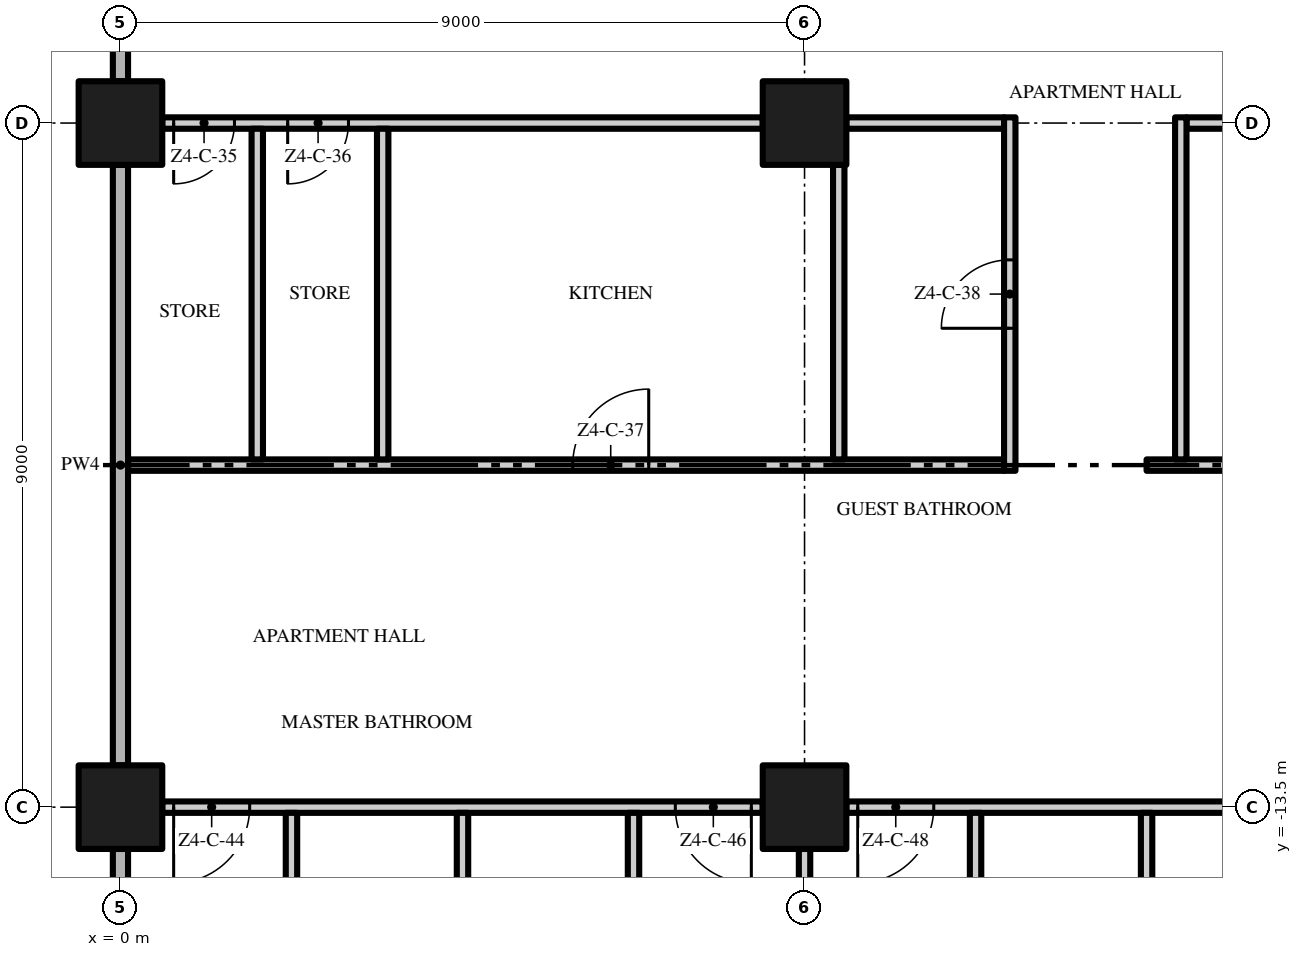
"""IFC4 building model, lengths in metres.
Left out: names, types, materials, properties, quantities, classifications, styles, units other than length and angle.
Written with IfcOpenShell. Run it as: python <this file> out.ifc"""

import sys

from ifc_helpers import new_model, si_unit, direction, frame, frame_2d, origin, origin_2d, place, context, subcontext, project, spatial, rectangle, extrude, element, fill, save


model = new_model("IFC4")
c1 = context("Model", 3, precision=1e-05, world=origin(), true_north=direction((0.0, 1.0)))
c2 = subcontext(c1, "Body", "Model", "MODEL_VIEW")
j1 = project(units=[si_unit("LENGTHUNIT", "METRE"), si_unit("PLANEANGLEUNIT", "RADIAN")], contexts=[c1])
p1 = place(None, origin())
s1 = spatial("IfcSite", under=j1, at=p1, CompositionType="ELEMENT")
p2 = place(p1, origin())
s2 = spatial("IfcBuilding", under=s1, at=p2, CompositionType="ELEMENT")
p3 = place(p2, frame((0.0, 0.0, 207.2)))
s3 = spatial("IfcBuildingStorey", under=s2, at=p3, CompositionType="ELEMENT", Elevation=207.2)
for number, where, z_axis, x_axis in (
    (1, (0.0, -13.5, 0.0), (0.0, 0.0, 1.0), (1.0, 0.0, 0.0)),
    (2, (0.0, -4.5, 0.0), (0.0, 0.0, 1.0), (1.0, 0.0, 0.0)),
    (3, (9.0, -13.5, 0.0), (0.0, 0.0, 1.0), (1.0, 0.0, 0.0)),
    (4, (9.0, -4.5, 0.0), (0.0, 0.0, 1.0), (1.0, 0.0, 0.0)),
):
    element("IfcColumn", number, at=place(p3, frame(where, z_axis=z_axis, x_axis=x_axis)), inside=s3, PredefinedType="COLUMN", context=c2, shape_type="SweptSolid", body=[
        extrude(rectangle(XDim=1.1, YDim=1.1, at=origin_2d()), origin(), (0.0, 0.0, 1.0), 3.5),
    ])
p4 = place(p3, frame((8.45, -13.5, 0.0), z_axis=(0.0, 0.0, 1.0), x_axis=(-1.0, 0.0, 0.0)))
e5 = element("IfcWall", 5, at=p4, inside=s3, PredefinedType="PARTITIONING", context=c2, shape_type="SweptSolid", body=[
    extrude(rectangle(XDim=7.9, YDim=0.15, at=frame_2d((3.95, 0.0))), origin(), (0.0, 0.0, 1.0), 3.5),
])
p5 = place(p4, frame((6.75, 0.0, 0.0)))
e6 = element("IfcOpeningElement", 6, at=p5, cuts=e5, PredefinedType="OPENING", context=c2, shape_type="SweptSolid", body=[
    extrude(rectangle(XDim=1.0, YDim=2.4, at=frame_2d((0.5, 1.2))), frame((0.0, 0.085, 0.0), z_axis=(0.0, -1.0, 0.0), x_axis=(1.0, 0.0, 0.0)), (0.0, 0.0, 1.0), 0.17),
])
p6 = place(p4, frame((0.15, 0.0, 0.0)))
e7 = element("IfcOpeningElement", 7, at=p6, cuts=e5, PredefinedType="OPENING", context=c2, shape_type="SweptSolid", body=[
    extrude(rectangle(XDim=1.0, YDim=2.4, at=frame_2d((0.5, 1.2))), frame((0.0, 0.085, 0.0), z_axis=(0.0, -1.0, 0.0), x_axis=(1.0, 0.0, 0.0)), (0.0, 0.0, 1.0), 0.17),
])
p7 = place(p3, frame((17.45, -13.5, 0.0), z_axis=(0.0, 0.0, 1.0), x_axis=(-1.0, 0.0, 0.0)))
e8 = element("IfcWall", 8, at=p7, inside=s3, PredefinedType="PARTITIONING", context=c2, shape_type="SweptSolid", body=[
    extrude(rectangle(XDim=7.9, YDim=0.15, at=frame_2d((3.95, 0.0))), origin(), (0.0, 0.0, 1.0), 3.5),
])
p8 = place(p7, frame((6.75, 0.0, 0.0)))
e9 = element("IfcOpeningElement", 9, at=p8, cuts=e8, PredefinedType="OPENING", context=c2, shape_type="SweptSolid", body=[
    extrude(rectangle(XDim=1.0, YDim=2.4, at=frame_2d((0.5, 1.2))), frame((0.0, 0.085, 0.0), z_axis=(0.0, -1.0, 0.0), x_axis=(1.0, 0.0, 0.0)), (0.0, 0.0, 1.0), 0.17),
])
p9 = place(p7, frame((0.15, 0.0, 0.0)))
e10 = element("IfcOpeningElement", 10, at=p9, cuts=e8, PredefinedType="OPENING", context=c2, shape_type="SweptSolid", body=[
    extrude(rectangle(XDim=1.0, YDim=2.4, at=frame_2d((0.5, 1.2))), frame((0.0, 0.085, 0.0), z_axis=(0.0, -1.0, 0.0), x_axis=(1.0, 0.0, 0.0)), (0.0, 0.0, 1.0), 0.17),
])
p10 = place(p3, frame((0.1, -9.0, 0.0), z_axis=(0.0, 0.0, 1.0), x_axis=(1.0, 0.0, 0.0)))
e11 = element("IfcWall", 11, at=p10, inside=s3, PredefinedType="PARTITIONING", context=c2, shape_type="SweptSolid", body=[
    extrude(rectangle(XDim=11.525, YDim=0.15, at=frame_2d((5.763, 0.0))), origin(), (0.0, 0.0, 1.0), 3.5),
])
p11 = place(p10, frame((5.85, 0.0, 0.0)))
e12 = element("IfcOpeningElement", 12, at=p11, cuts=e11, PredefinedType="OPENING", context=c2, shape_type="SweptSolid", body=[
    extrude(rectangle(XDim=1.0, YDim=2.4, at=frame_2d((0.5, 1.2))), frame((0.0, 0.085, 0.0), z_axis=(0.0, -1.0, 0.0), x_axis=(1.0, 0.0, 0.0)), (0.0, 0.0, 1.0), 0.17),
])
p12 = place(p3, frame((13.5, -9.0, 0.0), z_axis=(0.0, 0.0, 1.0), x_axis=(1.0, 0.0, 0.0)))
e13 = element("IfcWall", 13, at=p12, inside=s3, PredefinedType="PARTITIONING", context=c2, shape_type="SweptSolid", body=[
    extrude(rectangle(XDim=13.2, YDim=0.15, at=frame_2d((6.6, 0.0))), origin(), (0.0, 0.0, 1.0), 3.5),
])
p13 = place(p12, frame((4.1, 0.0, 0.0)))
e14 = element("IfcOpeningElement", 14, at=p13, cuts=e13, PredefinedType="OPENING", context=c2, shape_type="SweptSolid", body=[
    extrude(rectangle(XDim=0.8, YDim=2.0, at=frame_2d((0.4, 1.0))), frame((0.0, 0.085, 0.0), z_axis=(0.0, -1.0, 0.0), x_axis=(1.0, 0.0, 0.0)), (0.0, 0.0, 1.0), 0.17),
])
p14 = place(p3, frame((8.45, -4.5, 0.0), z_axis=(0.0, 0.0, 1.0), x_axis=(-1.0, 0.0, 0.0)))
e15 = element("IfcWall", 15, at=p14, inside=s3, PredefinedType="PARTITIONING", context=c2, shape_type="SweptSolid", body=[
    extrude(rectangle(XDim=7.9, YDim=0.15, at=frame_2d((3.95, 0.0))), origin(), (0.0, 0.0, 1.0), 3.5),
])
p15 = place(p14, frame((6.95, 0.0, 0.0)))
e16 = element("IfcOpeningElement", 16, at=p15, cuts=e15, PredefinedType="OPENING", context=c2, shape_type="SweptSolid", body=[
    extrude(rectangle(XDim=0.8, YDim=2.0, at=frame_2d((0.4, 1.0))), frame((0.0, 0.085, 0.0), z_axis=(0.0, -1.0, 0.0), x_axis=(1.0, 0.0, 0.0)), (0.0, 0.0, 1.0), 0.17),
])
p16 = place(p14, frame((5.45, 0.0, 0.0)))
e17 = element("IfcOpeningElement", 17, at=p16, cuts=e15, PredefinedType="OPENING", context=c2, shape_type="SweptSolid", body=[
    extrude(rectangle(XDim=0.8, YDim=2.0, at=frame_2d((0.4, 1.0))), frame((0.0, 0.085, 0.0), z_axis=(0.0, -1.0, 0.0), x_axis=(1.0, 0.0, 0.0)), (0.0, 0.0, 1.0), 0.17),
])
p17 = place(p3, frame((9.55, -4.5, 0.0), z_axis=(0.0, 0.0, 1.0), x_axis=(1.0, 0.0, 0.0)))
e18 = element("IfcWall", 18, at=p17, inside=s3, PredefinedType="PARTITIONING", context=c2, shape_type="SweptSolid", body=[
    extrude(rectangle(XDim=2.075, YDim=0.15, at=frame_2d((1.038, 0.0))), origin(), (0.0, 0.0, 1.0), 3.5),
])
p18 = place(p3, frame((17.45, -4.5, 0.0), z_axis=(0.0, 0.0, 1.0), x_axis=(-1.0, 0.0, 0.0)))
e19 = element("IfcWall", 19, at=p18, inside=s3, PredefinedType="PARTITIONING", context=c2, shape_type="SweptSolid", body=[
    extrude(rectangle(XDim=3.425, YDim=0.15, at=frame_2d((1.712, 0.0))), origin(), (0.0, 0.0, 1.0), 3.5),
])
p19 = place(p18, frame((1.825, 0.0, 0.0)))
e20 = element("IfcOpeningElement", 20, at=p19, cuts=e19, PredefinedType="OPENING", context=c2, shape_type="SweptSolid", body=[
    extrude(rectangle(XDim=0.8, YDim=2.0, at=frame_2d((0.4, 1.0))), frame((0.0, 0.085, 0.0), z_axis=(0.0, -1.0, 0.0), x_axis=(1.0, 0.0, 0.0)), (0.0, 0.0, 1.0), 0.17),
])
p20 = place(p3, frame((0.0, -21.5, 0.0), z_axis=(0.0, 0.0, 1.0), x_axis=(0.0, 1.0, 0.0)))
e21 = element("IfcWall", 21, at=p20, inside=s3, PredefinedType="PARTITIONING", context=c2, shape_type="SweptSolid", body=[
    extrude(rectangle(XDim=7.45, YDim=0.2, at=frame_2d((3.725, 0.0))), origin(), (0.0, 0.0, 1.0), 3.5),
])
p21 = place(p3, frame((0.0, -12.95, 0.0), z_axis=(0.0, 0.0, 1.0), x_axis=(0.0, 1.0, 0.0)))
e22 = element("IfcWall", 22, at=p21, inside=s3, PredefinedType="PARTITIONING", context=c2, shape_type="SweptSolid", body=[
    extrude(rectangle(XDim=7.9, YDim=0.2, at=frame_2d((3.95, 0.0))), origin(), (0.0, 0.0, 1.0), 3.5),
])
p22 = place(p3, frame((0.0, -3.95, 0.0), z_axis=(0.0, 0.0, 1.0), x_axis=(0.0, 1.0, 0.0)))
e23 = element("IfcWall", 23, at=p22, inside=s3, PredefinedType="PARTITIONING", context=c2, shape_type="SweptSolid", body=[
    extrude(rectangle(XDim=4.05, YDim=0.2, at=frame_2d((2.025, 0.0))), origin(), (0.0, 0.0, 1.0), 3.5),
])
p23 = place(p3, frame((1.8, -8.925, 0.0), z_axis=(0.0, 0.0, 1.0), x_axis=(0.0, 1.0, 0.0)))
e24 = element("IfcWall", 24, at=p23, inside=s3, PredefinedType="PARTITIONING", context=c2, shape_type="SweptSolid", body=[
    extrude(rectangle(XDim=4.35, YDim=0.15, at=frame_2d((2.175, 0.0))), origin(), (0.0, 0.0, 1.0), 3.5),
])
p24 = place(p3, frame((2.25, -16.575, 0.0), z_axis=(0.0, 0.0, 1.0), x_axis=(0.0, 1.0, 0.0)))
e25 = element("IfcWall", 25, at=p24, inside=s3, PredefinedType="PARTITIONING", context=c2, shape_type="SweptSolid", body=[
    extrude(rectangle(XDim=3.0, YDim=0.15, at=frame_2d((1.5, 0.0))), origin(), (0.0, 0.0, 1.0), 3.5),
])
p25 = place(p3, frame((3.45, -8.925, 0.0), z_axis=(0.0, 0.0, 1.0), x_axis=(0.0, 1.0, 0.0)))
e26 = element("IfcWall", 26, at=p25, inside=s3, PredefinedType="PARTITIONING", context=c2, shape_type="SweptSolid", body=[
    extrude(rectangle(XDim=4.35, YDim=0.15, at=frame_2d((2.175, 0.0))), origin(), (0.0, 0.0, 1.0), 3.5),
])
p26 = place(p3, frame((4.5, -22.2, 0.0), z_axis=(0.0, 0.0, 1.0), x_axis=(0.0, 1.0, 0.0)))
e27 = element("IfcWall", 27, at=p26, inside=s3, PredefinedType="PARTITIONING", context=c2, shape_type="SweptSolid", body=[
    extrude(rectangle(XDim=8.625, YDim=0.15, at=frame_2d((4.312, 0.0))), origin(), (0.0, 0.0, 1.0), 3.5),
])
p27 = place(p3, frame((6.75, -16.575, 0.0), z_axis=(0.0, 0.0, 1.0), x_axis=(0.0, 1.0, 0.0)))
e28 = element("IfcWall", 28, at=p27, inside=s3, PredefinedType="PARTITIONING", context=c2, shape_type="SweptSolid", body=[
    extrude(rectangle(XDim=3.0, YDim=0.15, at=frame_2d((1.5, 0.0))), origin(), (0.0, 0.0, 1.0), 3.5),
])
p28 = place(p3, frame((9.0, -21.5, 0.0), z_axis=(0.0, 0.0, 1.0), x_axis=(0.0, 1.0, 0.0)))
e29 = element("IfcWall", 29, at=p28, inside=s3, PredefinedType="PARTITIONING", context=c2, shape_type="SweptSolid", body=[
    extrude(rectangle(XDim=7.45, YDim=0.15, at=frame_2d((3.725, 0.0))), origin(), (0.0, 0.0, 1.0), 3.5),
])
p29 = place(p3, frame((9.45, -8.925, 0.0), z_axis=(0.0, 0.0, 1.0), x_axis=(0.0, 1.0, 0.0)))
e30 = element("IfcWall", 30, at=p29, inside=s3, PredefinedType="PARTITIONING", context=c2, shape_type="SweptSolid", body=[
    extrude(rectangle(XDim=3.875, YDim=0.15, at=frame_2d((1.938, 0.0))), origin(), (0.0, 0.0, 1.0), 3.5),
])
p30 = place(p3, frame((11.25, -16.575, 0.0), z_axis=(0.0, 0.0, 1.0), x_axis=(0.0, 1.0, 0.0)))
e31 = element("IfcWall", 31, at=p30, inside=s3, PredefinedType="PARTITIONING", context=c2, shape_type="SweptSolid", body=[
    extrude(rectangle(XDim=3.0, YDim=0.15, at=frame_2d((1.5, 0.0))), origin(), (0.0, 0.0, 1.0), 3.5),
])
p31 = place(p3, frame((11.7, -9.075, 0.0), z_axis=(0.0, 0.0, 1.0), x_axis=(0.0, 1.0, 0.0)))
e32 = element("IfcWall", 32, at=p31, inside=s3, PredefinedType="PARTITIONING", context=c2, shape_type="SweptSolid", body=[
    extrude(rectangle(XDim=4.65, YDim=0.15, at=frame_2d((2.325, 0.0))), origin(), (0.0, 0.0, 1.0), 3.5),
])
p32 = place(p31, frame((1.875, 0.0, 0.0)))
e33 = element("IfcOpeningElement", 33, at=p32, cuts=e32, PredefinedType="OPENING", context=c2, shape_type="SweptSolid", body=[
    extrude(rectangle(XDim=0.9, YDim=2.1, at=frame_2d((0.45, 1.05))), frame((0.0, 0.085, 0.0), z_axis=(0.0, -1.0, 0.0), x_axis=(1.0, 0.0, 0.0)), (0.0, 0.0, 1.0), 0.17),
])
p33 = place(p3, frame((13.5, -22.2, 0.0), z_axis=(0.0, 0.0, 1.0), x_axis=(0.0, 1.0, 0.0)))
e34 = element("IfcWall", 34, at=p33, inside=s3, PredefinedType="PARTITIONING", context=c2, shape_type="SweptSolid", body=[
    extrude(rectangle(XDim=8.625, YDim=0.15, at=frame_2d((4.312, 0.0))), origin(), (0.0, 0.0, 1.0), 3.5),
])
p34 = place(p3, frame((13.95, -8.925, 0.0), z_axis=(0.0, 0.0, 1.0), x_axis=(0.0, 1.0, 0.0)))
e35 = element("IfcWall", 35, at=p34, inside=s3, PredefinedType="PARTITIONING", context=c2, shape_type="SweptSolid", body=[
    extrude(rectangle(XDim=4.5, YDim=0.15, at=frame_2d((2.25, 0.0))), origin(), (0.0, 0.0, 1.0), 3.5),
])
p35 = place(p15, origin())
e36 = element("IfcDoor", 36, at=p35, inside=s3, OperationType="SINGLE_SWING_RIGHT", PredefinedType="DOOR", context=c2, shape_type="SweptSolid", body=[
    extrude(rectangle(XDim=0.8, YDim=2.0, at=frame_2d((0.4, 1.0))), frame((0.0, 0.025, 0.0), z_axis=(0.0, -1.0, 0.0), x_axis=(1.0, 0.0, 0.0)), (0.0, 0.0, 1.0), 0.05),
])
fill(e16, e36)
p36 = place(p16, origin())
e37 = element("IfcDoor", 37, at=p36, inside=s3, OperationType="SINGLE_SWING_RIGHT", PredefinedType="DOOR", context=c2, shape_type="SweptSolid", body=[
    extrude(rectangle(XDim=0.8, YDim=2.0, at=frame_2d((0.4, 1.0))), frame((0.0, 0.025, 0.0), z_axis=(0.0, -1.0, 0.0), x_axis=(1.0, 0.0, 0.0)), (0.0, 0.0, 1.0), 0.05),
])
fill(e17, e37)
p37 = place(p11, origin())
e38 = element("IfcDoor", 38, at=p37, inside=s3, OperationType="SINGLE_SWING_RIGHT", PredefinedType="DOOR", context=c2, shape_type="SweptSolid", body=[
    extrude(rectangle(XDim=1.0, YDim=2.4, at=frame_2d((0.5, 1.2))), frame((0.0, 0.025, 0.0), z_axis=(0.0, -1.0, 0.0), x_axis=(1.0, 0.0, 0.0)), (0.0, 0.0, 1.0), 0.05),
])
fill(e12, e38)
p38 = place(p32, origin())
e39 = element("IfcDoor", 39, at=p38, inside=s3, OperationType="SINGLE_SWING_LEFT", PredefinedType="DOOR", context=c2, shape_type="SweptSolid", body=[
    extrude(rectangle(XDim=0.9, YDim=2.1, at=frame_2d((0.45, 1.05))), frame((0.0, 0.025, 0.0), z_axis=(0.0, -1.0, 0.0), x_axis=(1.0, 0.0, 0.0)), (0.0, 0.0, 1.0), 0.05),
])
fill(e33, e39)
p39 = place(p5, origin())
e40 = element("IfcDoor", 40, at=p39, inside=s3, OperationType="SINGLE_SWING_RIGHT", PredefinedType="DOOR", context=c2, shape_type="SweptSolid", body=[
    extrude(rectangle(XDim=1.0, YDim=2.4, at=frame_2d((0.5, 1.2))), frame((0.0, 0.025, 0.0), z_axis=(0.0, -1.0, 0.0), x_axis=(1.0, 0.0, 0.0)), (0.0, 0.0, 1.0), 0.05),
])
fill(e6, e40)
p40 = place(p6, origin())
e41 = element("IfcDoor", 41, at=p40, inside=s3, OperationType="SINGLE_SWING_LEFT", PredefinedType="DOOR", context=c2, shape_type="SweptSolid", body=[
    extrude(rectangle(XDim=1.0, YDim=2.4, at=frame_2d((0.5, 1.2))), frame((0.0, 0.025, 0.0), z_axis=(0.0, -1.0, 0.0), x_axis=(1.0, 0.0, 0.0)), (0.0, 0.0, 1.0), 0.05),
])
fill(e7, e41)
p41 = place(p8, origin())
e42 = element("IfcDoor", 42, at=p41, inside=s3, OperationType="SINGLE_SWING_RIGHT", PredefinedType="DOOR", context=c2, shape_type="SweptSolid", body=[
    extrude(rectangle(XDim=1.0, YDim=2.4, at=frame_2d((0.5, 1.2))), frame((0.0, 0.025, 0.0), z_axis=(0.0, -1.0, 0.0), x_axis=(1.0, 0.0, 0.0)), (0.0, 0.0, 1.0), 0.05),
])
fill(e9, e42)
save(model, sys.argv[1])
